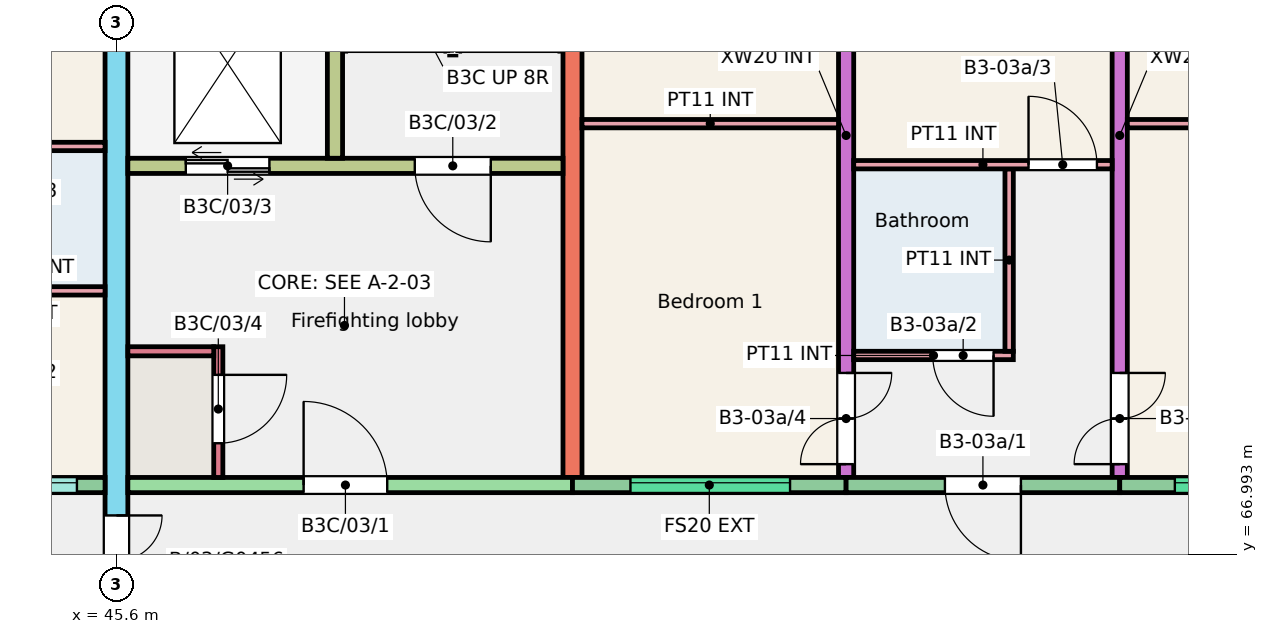
"""IFC4 building model, lengths in metres.
Left out: names, types, materials, properties, quantities, classifications, styles, units other than length and angle.
Written with IfcOpenShell. Run it as: python <this file> out.ifc"""

import sys

from ifc_helpers import new_model, si_unit, direction, frame, frame_2d, origin, place, context, subcontext, project, spatial, rectangle, extrude, element, fill, save


model = new_model("IFC4")
c1 = context("Model", 3, precision=1e-05, world=origin(), true_north=direction((0.0, 1.0)))
c2 = subcontext(c1, "Body", "Model", "MODEL_VIEW")
j1 = project(units=[si_unit("LENGTHUNIT", "METRE"), si_unit("PLANEANGLEUNIT", "RADIAN")], contexts=[c1])
p1 = place(None, origin())
s1 = spatial("IfcSite", under=j1, at=p1, CompositionType="ELEMENT")
p2 = place(p1, origin())
s2 = spatial("IfcBuilding", under=s1, at=p2, CompositionType="ELEMENT")
p3 = place(p2, frame((0.0, 0.0, 9.0)))
s3 = spatial("IfcBuildingStorey", under=s2, at=p3, CompositionType="ELEMENT", Elevation=9.0)
p4 = place(p3, frame((45.6, 66.0, 0.0), z_axis=(0.0, 0.0, 1.0), x_axis=(0.0, 1.0, 0.0)))
e1 = element("IfcWall", 1, at=p4, inside=s3, PredefinedType="SHEAR", context=c2, shape_type="SweptSolid", body=[
    extrude(rectangle(XDim=11.0, YDim=0.3, at=frame_2d((5.5, 0.0))), origin(), (0.0, 0.0, 1.0), 3.0),
])
p5 = place(p4, frame((0.3, 0.0, 0.0)))
e2 = element("IfcOpeningElement", 2, at=p5, cuts=e1, PredefinedType="OPENING", context=c2, shape_type="SweptSolid", body=[
    extrude(rectangle(XDim=1.2, YDim=2.1, at=frame_2d((0.6, 1.05))), frame((0.0, 0.16, 0.0), z_axis=(0.0, -1.0, 0.0), x_axis=(1.0, 0.0, 0.0)), (0.0, 0.0, 1.0), 0.32),
])
p6 = place(p3, frame((51.6, 68.0, 0.0), z_axis=(0.0, 0.0, 1.0), x_axis=(0.0, 1.0, 0.0)))
e3 = element("IfcWall", 3, at=p6, inside=s3, PredefinedType="SHEAR", context=c2, shape_type="SweptSolid", body=[
    extrude(rectangle(XDim=9.0, YDim=0.25, at=frame_2d((4.5, 0.0))), origin(), (0.0, 0.0, 1.0), 3.0),
])
p7 = place(p3, frame((55.2, 68.0, 0.0), z_axis=(0.0, 0.0, 1.0), x_axis=(0.0, 1.0, 0.0)))
e4 = element("IfcWall", 4, at=p7, inside=s3, PredefinedType="SHEAR", context=c2, shape_type="SweptSolid", body=[
    extrude(rectangle(XDim=9.0, YDim=0.2, at=frame_2d((4.5, 0.0))), origin(), (0.0, 0.0, 1.0), 3.0),
])
p8 = place(p7, frame((0.175, 0.0, 0.0)))
e5 = element("IfcOpeningElement", 5, at=p8, cuts=e4, PredefinedType="OPENING", context=c2, shape_type="SweptSolid", body=[
    extrude(rectangle(XDim=1.2, YDim=2.1, at=frame_2d((0.6, 1.05))), frame((0.0, 0.11, 0.0), z_axis=(0.0, -1.0, 0.0), x_axis=(1.0, 0.0, 0.0)), (0.0, 0.0, 1.0), 0.22),
])
p9 = place(p7, frame((6.4, 0.0, 0.0)))
e6 = element("IfcOpeningElement", 6, at=p9, cuts=e4, PredefinedType="OPENING", context=c2, shape_type="SweptSolid", body=[
    extrude(rectangle(XDim=1.2, YDim=2.1, at=frame_2d((0.6, 1.05))), frame((0.0, 0.11, 0.0), z_axis=(0.0, -1.0, 0.0), x_axis=(1.0, 0.0, 0.0)), (0.0, 0.0, 1.0), 0.22),
])
p10 = place(p3, frame((58.8, 68.0, 0.0), z_axis=(0.0, 0.0, 1.0), x_axis=(0.0, 1.0, 0.0)))
e7 = element("IfcWall", 7, at=p10, inside=s3, PredefinedType="SHEAR", context=c2, shape_type="SweptSolid", body=[
    extrude(rectangle(XDim=9.0, YDim=0.2, at=frame_2d((4.5, 0.0))), origin(), (0.0, 0.0, 1.0), 3.0),
])
p11 = place(p10, frame((0.175, 0.0, 0.0)))
e8 = element("IfcOpeningElement", 8, at=p11, cuts=e7, PredefinedType="OPENING", context=c2, shape_type="SweptSolid", body=[
    extrude(rectangle(XDim=1.2, YDim=2.1, at=frame_2d((0.6, 1.05))), frame((0.0, 0.11, 0.0), z_axis=(0.0, -1.0, 0.0), x_axis=(1.0, 0.0, 0.0)), (0.0, 0.0, 1.0), 0.22),
])
p12 = place(p10, frame((6.4, 0.0, 0.0)))
e9 = element("IfcOpeningElement", 9, at=p12, cuts=e7, PredefinedType="OPENING", context=c2, shape_type="SweptSolid", body=[
    extrude(rectangle(XDim=1.2, YDim=2.1, at=frame_2d((0.6, 1.05))), frame((0.0, 0.11, 0.0), z_axis=(0.0, -1.0, 0.0), x_axis=(1.0, 0.0, 0.0)), (0.0, 0.0, 1.0), 0.22),
])
p13 = place(p3, frame((42.0, 67.9, 0.0), z_axis=(0.0, 0.0, 1.0), x_axis=(1.0, 0.0, 0.0)))
e10 = element("IfcWall", 10, at=p13, inside=s3, PredefinedType="SOLIDWALL", context=c2, shape_type="SweptSolid", body=[
    extrude(rectangle(XDim=3.45, YDim=0.2, at=frame_2d((1.725, 0.0))), origin(), (0.0, 0.0, 1.0), 3.0),
])
p14 = place(p13, frame((1.88, 0.0, 1.1)))
e11 = element("IfcOpeningElement", 11, at=p14, cuts=e10, PredefinedType="OPENING", context=c2, shape_type="SweptSolid", body=[
    extrude(rectangle(XDim=1.2, YDim=1.3, at=frame_2d((0.6, 0.65))), frame((0.0, 0.11, 0.0), z_axis=(0.0, -1.0, 0.0), x_axis=(1.0, 0.0, 0.0)), (0.0, 0.0, 1.0), 0.22),
])
p15 = place(p13, frame((0.25, 0.0, 0.0)))
e12 = element("IfcOpeningElement", 12, at=p15, cuts=e10, PredefinedType="OPENING", context=c2, shape_type="SweptSolid", body=[
    extrude(rectangle(XDim=1.0, YDim=2.1, at=frame_2d((0.5, 1.05))), frame((0.0, 0.11, 0.0), z_axis=(0.0, -1.0, 0.0), x_axis=(1.0, 0.0, 0.0)), (0.0, 0.0, 1.0), 0.22),
])
p16 = place(p3, frame((45.75, 67.9, 0.0), z_axis=(0.0, 0.0, 1.0), x_axis=(1.0, 0.0, 0.0)))
e13 = element("IfcWall", 13, at=p16, inside=s3, PredefinedType="SHEAR", context=c2, shape_type="SweptSolid", body=[
    extrude(rectangle(XDim=5.85, YDim=0.2, at=frame_2d((2.925, 0.0))), origin(), (0.0, 0.0, 1.0), 3.0),
])
p17 = place(p16, frame((2.312, 0.0, 0.0)))
e14 = element("IfcOpeningElement", 14, at=p17, cuts=e13, PredefinedType="OPENING", context=c2, shape_type="SweptSolid", body=[
    extrude(rectangle(XDim=1.1, YDim=2.1, at=frame_2d((0.55, 1.05))), frame((0.0, 0.11, 0.0), z_axis=(0.0, -1.0, 0.0), x_axis=(1.0, 0.0, 0.0)), (0.0, 0.0, 1.0), 0.22),
])
p18 = place(p3, frame((45.75, 72.1, 0.0), z_axis=(0.0, 0.0, 1.0), x_axis=(1.0, 0.0, 0.0)))
e15 = element("IfcWall", 15, at=p18, inside=s3, PredefinedType="SHEAR", context=c2, shape_type="SweptSolid", body=[
    extrude(rectangle(XDim=5.725, YDim=0.2, at=frame_2d((2.863, 0.0))), origin(), (0.0, 0.0, 1.0), 3.0),
])
p19 = place(p18, frame((3.775, 0.0, 0.0)))
e16 = element("IfcOpeningElement", 16, at=p19, cuts=e15, PredefinedType="OPENING", context=c2, shape_type="SweptSolid", body=[
    extrude(rectangle(XDim=1.0, YDim=2.1, at=frame_2d((0.5, 1.05))), frame((0.0, 0.11, 0.0), z_axis=(0.0, -1.0, 0.0), x_axis=(1.0, 0.0, 0.0)), (0.0, 0.0, 1.0), 0.22),
])
p20 = place(p18, frame((0.762, 0.0, 0.0)))
e17 = element("IfcOpeningElement", 17, at=p20, cuts=e15, PredefinedType="OPENING", context=c2, shape_type="SweptSolid", body=[
    extrude(rectangle(XDim=1.1, YDim=2.1, at=frame_2d((0.55, 1.05))), frame((0.0, 0.11, 0.0), z_axis=(0.0, -1.0, 0.0), x_axis=(1.0, 0.0, 0.0)), (0.0, 0.0, 1.0), 0.22),
])
p21 = place(p3, frame((48.475, 72.2, 0.0), z_axis=(0.0, 0.0, 1.0), x_axis=(0.0, 1.0, 0.0)))
e18 = element("IfcWall", 18, at=p21, inside=s3, PredefinedType="SHEAR", context=c2, shape_type="SweptSolid", body=[
    extrude(rectangle(XDim=4.8, YDim=0.2, at=frame_2d((2.4, 0.0))), origin(), (0.0, 0.0, 1.0), 3.0),
])
p22 = place(p3, frame((46.94, 68.0, 0.0), z_axis=(0.0, 0.0, 1.0), x_axis=(0.0, 1.0, 0.0)))
e19 = element("IfcWall", 19, at=p22, inside=s3, PredefinedType="SHEAR", context=c2, shape_type="SweptSolid", body=[
    extrude(rectangle(XDim=1.72, YDim=0.12, at=frame_2d((0.86, 0.0))), origin(), (0.0, 0.0, 1.0), 3.0),
])
p23 = place(p22, frame((0.45, 0.0, 0.0)))
e20 = element("IfcOpeningElement", 20, at=p23, cuts=e19, PredefinedType="OPENING", context=c2, shape_type="SweptSolid", body=[
    extrude(rectangle(XDim=0.9, YDim=2.1, at=frame_2d((0.45, 1.05))), frame((0.0, 0.07, 0.0), z_axis=(0.0, -1.0, 0.0), x_axis=(1.0, 0.0, 0.0)), (0.0, 0.0, 1.0), 0.14),
])
p24 = place(p3, frame((45.75, 69.66, 0.0), z_axis=(0.0, 0.0, 1.0), x_axis=(1.0, 0.0, 0.0)))
e21 = element("IfcWall", 21, at=p24, inside=s3, PredefinedType="SHEAR", context=c2, shape_type="SweptSolid", body=[
    extrude(rectangle(XDim=1.13, YDim=0.12, at=frame_2d((0.565, 0.0))), origin(), (0.0, 0.0, 1.0), 3.0),
])
p25 = place(p3, frame((51.6, 67.9, 0.0), z_axis=(0.0, 0.0, 1.0), x_axis=(1.0, 0.0, 0.0)))
e22 = element("IfcWall", 22, at=p25, inside=s3, PredefinedType="SOLIDWALL", context=c2, shape_type="SweptSolid", body=[
    extrude(rectangle(XDim=3.6, YDim=0.2, at=frame_2d((1.8, 0.0))), origin(), (0.0, 0.0, 1.0), 3.0),
])
p26 = place(p25, frame((0.762, 0.0, 1.2)))
e23 = element("IfcOpeningElement", 23, at=p26, cuts=e22, PredefinedType="OPENING", context=c2, shape_type="SweptSolid", body=[
    extrude(rectangle(XDim=2.1, YDim=1.2, at=frame_2d((1.05, 0.6))), frame((0.0, 0.11, 0.0), z_axis=(0.0, -1.0, 0.0), x_axis=(1.0, 0.0, 0.0)), (0.0, 0.0, 1.0), 0.22),
])
p27 = place(p3, frame((55.2, 67.9, 0.0), z_axis=(0.0, 0.0, 1.0), x_axis=(1.0, 0.0, 0.0)))
e24 = element("IfcWall", 24, at=p27, inside=s3, PredefinedType="SOLIDWALL", context=c2, shape_type="SweptSolid", body=[
    extrude(rectangle(XDim=3.6, YDim=0.2, at=frame_2d((1.8, 0.0))), origin(), (0.0, 0.0, 1.0), 3.0),
])
p28 = place(p27, frame((1.3, 0.0, 0.0)))
e25 = element("IfcOpeningElement", 25, at=p28, cuts=e24, PredefinedType="OPENING", context=c2, shape_type="SweptSolid", body=[
    extrude(rectangle(XDim=1.0, YDim=2.1, at=frame_2d((0.5, 1.05))), frame((0.0, 0.11, 0.0), z_axis=(0.0, -1.0, 0.0), x_axis=(1.0, 0.0, 0.0)), (0.0, 0.0, 1.0), 0.22),
])
p29 = place(p3, frame((58.8, 67.9, 0.0), z_axis=(0.0, 0.0, 1.0), x_axis=(1.0, 0.0, 0.0)))
e26 = element("IfcWall", 26, at=p29, inside=s3, PredefinedType="SOLIDWALL", context=c2, shape_type="SweptSolid", body=[
    extrude(rectangle(XDim=3.45, YDim=0.2, at=frame_2d((1.725, 0.0))), origin(), (0.0, 0.0, 1.0), 3.0),
])
p30 = place(p29, frame((0.725, 0.0, 1.2)))
e27 = element("IfcOpeningElement", 27, at=p30, cuts=e26, PredefinedType="OPENING", context=c2, shape_type="SweptSolid", body=[
    extrude(rectangle(XDim=2.1, YDim=1.2, at=frame_2d((1.05, 0.6))), frame((0.0, 0.11, 0.0), z_axis=(0.0, -1.0, 0.0), x_axis=(1.0, 0.0, 0.0)), (0.0, 0.0, 1.0), 0.22),
])
p31 = place(p3, frame((43.51, 70.455, 0.0), z_axis=(0.0, 0.0, 1.0), x_axis=(1.0, 0.0, 0.0)))
e28 = element("IfcWall", 28, at=p31, inside=s3, PredefinedType="PARTITIONING", context=c2, shape_type="SweptSolid", body=[
    extrude(rectangle(XDim=1.94, YDim=0.11, at=frame_2d((0.97, 0.0))), origin(), (0.0, 0.0, 1.0), 2.8),
])
p32 = place(p3, frame((42.1, 72.355, 0.0), z_axis=(0.0, 0.0, 1.0), x_axis=(1.0, 0.0, 0.0)))
e29 = element("IfcWall", 29, at=p32, inside=s3, PredefinedType="PARTITIONING", context=c2, shape_type="SweptSolid", body=[
    extrude(rectangle(XDim=3.35, YDim=0.11, at=frame_2d((1.675, 0.0))), origin(), (0.0, 0.0, 1.0), 2.8),
])
p33 = place(p32, frame((0.2, 0.0, 0.0)))
e30 = element("IfcOpeningElement", 30, at=p33, cuts=e29, PredefinedType="OPENING", context=c2, shape_type="SweptSolid", body=[
    extrude(rectangle(XDim=0.9, YDim=2.1, at=frame_2d((0.45, 1.05))), frame((0.0, 0.065, 0.0), z_axis=(0.0, -1.0, 0.0), x_axis=(1.0, 0.0, 0.0)), (0.0, 0.0, 1.0), 0.13),
])
p34 = place(p3, frame((55.3, 69.605, 0.0), z_axis=(0.0, 0.0, 1.0), x_axis=(1.0, 0.0, 0.0)))
e31 = element("IfcWall", 31, at=p34, inside=s3, PredefinedType="PARTITIONING", context=c2, shape_type="SweptSolid", body=[
    extrude(rectangle(XDim=2.1, YDim=0.11, at=frame_2d((1.05, 0.0))), origin(), (0.0, 0.0, 1.0), 2.8),
])
p35 = place(p34, frame((1.04, 0.0, 0.0)))
e32 = element("IfcOpeningElement", 32, at=p35, cuts=e31, PredefinedType="OPENING", context=c2, shape_type="SweptSolid", body=[
    extrude(rectangle(XDim=0.8, YDim=2.1, at=frame_2d((0.4, 1.05))), frame((0.0, 0.065, 0.0), z_axis=(0.0, -1.0, 0.0), x_axis=(1.0, 0.0, 0.0)), (0.0, 0.0, 1.0), 0.13),
])
p36 = place(p3, frame((57.345, 69.66, 0.0), z_axis=(0.0, 0.0, 1.0), x_axis=(0.0, 1.0, 0.0)))
e33 = element("IfcWall", 33, at=p36, inside=s3, PredefinedType="PARTITIONING", context=c2, shape_type="SweptSolid", body=[
    extrude(rectangle(XDim=2.4, YDim=0.11, at=frame_2d((1.2, 0.0))), origin(), (0.0, 0.0, 1.0), 2.8),
])
p37 = place(p3, frame((55.3, 72.115, 0.0), z_axis=(0.0, 0.0, 1.0), x_axis=(1.0, 0.0, 0.0)))
e34 = element("IfcWall", 34, at=p37, inside=s3, PredefinedType="PARTITIONING", context=c2, shape_type="SweptSolid", body=[
    extrude(rectangle(XDim=3.4, YDim=0.11, at=frame_2d((1.7, 0.0))), origin(), (0.0, 0.0, 1.0), 2.8),
])
p38 = place(p37, frame((2.3, 0.0, 0.0)))
e35 = element("IfcOpeningElement", 35, at=p38, cuts=e34, PredefinedType="OPENING", context=c2, shape_type="SweptSolid", body=[
    extrude(rectangle(XDim=0.9, YDim=2.1, at=frame_2d((0.45, 1.05))), frame((0.0, 0.065, 0.0), z_axis=(0.0, -1.0, 0.0), x_axis=(1.0, 0.0, 0.0)), (0.0, 0.0, 1.0), 0.13),
])
p39 = place(p3, frame((51.725, 72.655, 0.0), z_axis=(0.0, 0.0, 1.0), x_axis=(1.0, 0.0, 0.0)))
e36 = element("IfcWall", 36, at=p39, inside=s3, PredefinedType="PARTITIONING", context=c2, shape_type="SweptSolid", body=[
    extrude(rectangle(XDim=3.375, YDim=0.11, at=frame_2d((1.688, 0.0))), origin(), (0.0, 0.0, 1.0), 2.8),
])
p40 = place(p3, frame((58.9, 72.655, 0.0), z_axis=(0.0, 0.0, 1.0), x_axis=(1.0, 0.0, 0.0)))
e37 = element("IfcWall", 37, at=p40, inside=s3, PredefinedType="PARTITIONING", context=c2, shape_type="SweptSolid", body=[
    extrude(rectangle(XDim=3.35, YDim=0.11, at=frame_2d((1.675, 0.0))), origin(), (0.0, 0.0, 1.0), 2.8),
])
p41 = place(p14, origin())
e38 = element("IfcWindow", 38, at=p41, inside=s3, PartitioningType="SINGLE_PANEL", PredefinedType="WINDOW", context=c2, shape_type="SweptSolid", body=[
    extrude(rectangle(XDim=1.2, YDim=1.3, at=frame_2d((0.6, 0.65))), frame((0.0, 0.06, 0.0), z_axis=(0.0, -1.0, 0.0), x_axis=(1.0, 0.0, 0.0)), (0.0, 0.0, 1.0), 0.06),
])
fill(e11, e38)
p42 = place(p26, origin())
e39 = element("IfcWindow", 39, at=p42, inside=s3, PartitioningType="SINGLE_PANEL", PredefinedType="WINDOW", context=c2, shape_type="SweptSolid", body=[
    extrude(rectangle(XDim=2.1, YDim=1.2, at=frame_2d((1.05, 0.6))), frame((0.0, 0.06, 0.0), z_axis=(0.0, -1.0, 0.0), x_axis=(1.0, 0.0, 0.0)), (0.0, 0.0, 1.0), 0.06),
])
fill(e23, e39)
p43 = place(p30, origin())
e40 = element("IfcWindow", 40, at=p43, inside=s3, PartitioningType="SINGLE_PANEL", PredefinedType="WINDOW", context=c2, shape_type="SweptSolid", body=[
    extrude(rectangle(XDim=2.1, YDim=1.2, at=frame_2d((1.05, 0.6))), frame((0.0, 0.06, 0.0), z_axis=(0.0, -1.0, 0.0), x_axis=(1.0, 0.0, 0.0)), (0.0, 0.0, 1.0), 0.06),
])
fill(e27, e40)
p44 = place(p28, origin())
e41 = element("IfcDoor", 41, at=p44, inside=s3, OperationType="SINGLE_SWING_RIGHT", PredefinedType="DOOR", context=c2, shape_type="SweptSolid", body=[
    extrude(rectangle(XDim=1.0, YDim=2.1, at=frame_2d((0.5, 1.05))), frame((0.0, 0.025, 0.0), z_axis=(0.0, -1.0, 0.0), x_axis=(1.0, 0.0, 0.0)), (0.0, 0.0, 1.0), 0.05),
])
fill(e25, e41)
p45 = place(p35, origin())
e42 = element("IfcDoor", 42, at=p45, inside=s3, OperationType="SINGLE_SWING_RIGHT", PredefinedType="DOOR", context=c2, shape_type="SweptSolid", body=[
    extrude(rectangle(XDim=0.8, YDim=2.1, at=frame_2d((0.4, 1.05))), frame((0.0, 0.025, 0.0), z_axis=(0.0, -1.0, 0.0), x_axis=(1.0, 0.0, 0.0)), (0.0, 0.0, 1.0), 0.05),
])
fill(e32, e42)
p46 = place(p38, origin())
e43 = element("IfcDoor", 43, at=p46, inside=s3, OperationType="SINGLE_SWING_LEFT", PredefinedType="DOOR", context=c2, shape_type="SweptSolid", body=[
    extrude(rectangle(XDim=0.9, YDim=2.1, at=frame_2d((0.45, 1.05))), frame((0.0, 0.025, 0.0), z_axis=(0.0, -1.0, 0.0), x_axis=(1.0, 0.0, 0.0)), (0.0, 0.0, 1.0), 0.05),
])
fill(e35, e43)
p47 = place(p8, origin())
e44 = element("IfcDoor", 44, at=p47, inside=s3, OperationType="DOUBLE_DOOR_SINGLE_SWING", PredefinedType="DOOR", context=c2, shape_type="SweptSolid", body=[
    extrude(rectangle(XDim=1.2, YDim=2.1, at=frame_2d((0.6, 1.05))), frame((0.0, 0.025, 0.0), z_axis=(0.0, -1.0, 0.0), x_axis=(1.0, 0.0, 0.0)), (0.0, 0.0, 1.0), 0.05),
])
fill(e5, e44)
p48 = place(p11, origin())
e45 = element("IfcDoor", 45, at=p48, inside=s3, OperationType="DOUBLE_DOOR_SINGLE_SWING", PredefinedType="DOOR", context=c2, shape_type="SweptSolid", body=[
    extrude(rectangle(XDim=1.2, YDim=2.1, at=frame_2d((0.6, 1.05))), frame((0.0, 0.025, 0.0), z_axis=(0.0, -1.0, 0.0), x_axis=(1.0, 0.0, 0.0)), (0.0, 0.0, 1.0), 0.05),
])
fill(e8, e45)
p49 = place(p17, origin())
e46 = element("IfcDoor", 46, at=p49, inside=s3, OperationType="SINGLE_SWING_LEFT", PredefinedType="DOOR", context=c2, shape_type="SweptSolid", body=[
    extrude(rectangle(XDim=1.1, YDim=2.1, at=frame_2d((0.55, 1.05))), frame((0.0, 0.025, 0.0), z_axis=(0.0, -1.0, 0.0), x_axis=(1.0, 0.0, 0.0)), (0.0, 0.0, 1.0), 0.05),
])
fill(e14, e46)
p50 = place(p19, origin())
e47 = element("IfcDoor", 47, at=p50, inside=s3, OperationType="SINGLE_SWING_RIGHT", PredefinedType="DOOR", context=c2, shape_type="SweptSolid", body=[
    extrude(rectangle(XDim=1.0, YDim=2.1, at=frame_2d((0.5, 1.05))), frame((0.0, 0.025, 0.0), z_axis=(0.0, -1.0, 0.0), x_axis=(1.0, 0.0, 0.0)), (0.0, 0.0, 1.0), 0.05),
])
fill(e16, e47)
p51 = place(p20, origin())
e48 = element("IfcDoor", 48, at=p51, inside=s3, OperationType="DOUBLE_DOOR_SLIDING", PredefinedType="DOOR", context=c2, shape_type="SweptSolid", body=[
    extrude(rectangle(XDim=1.1, YDim=2.1, at=frame_2d((0.55, 1.05))), frame((0.0, 0.025, 0.0), z_axis=(0.0, -1.0, 0.0), x_axis=(1.0, 0.0, 0.0)), (0.0, 0.0, 1.0), 0.05),
])
fill(e17, e48)
p52 = place(p23, origin())
e49 = element("IfcDoor", 49, at=p52, inside=s3, OperationType="SINGLE_SWING_RIGHT", PredefinedType="DOOR", context=c2, shape_type="SweptSolid", body=[
    extrude(rectangle(XDim=0.9, YDim=2.1, at=frame_2d((0.45, 1.05))), frame((0.0, 0.025, 0.0), z_axis=(0.0, -1.0, 0.0), x_axis=(1.0, 0.0, 0.0)), (0.0, 0.0, 1.0), 0.05),
])
fill(e20, e49)
p53 = place(p5, origin())
e50 = element("IfcDoor", 50, at=p53, inside=s3, OperationType="DOUBLE_DOOR_SINGLE_SWING", PredefinedType="DOOR", context=c2, shape_type="SweptSolid", body=[
    extrude(rectangle(XDim=1.2, YDim=2.1, at=frame_2d((0.6, 1.05))), frame((0.0, 0.025, 0.0), z_axis=(0.0, -1.0, 0.0), x_axis=(1.0, 0.0, 0.0)), (0.0, 0.0, 1.0), 0.05),
])
fill(e2, e50)
save(model, sys.argv[1])
